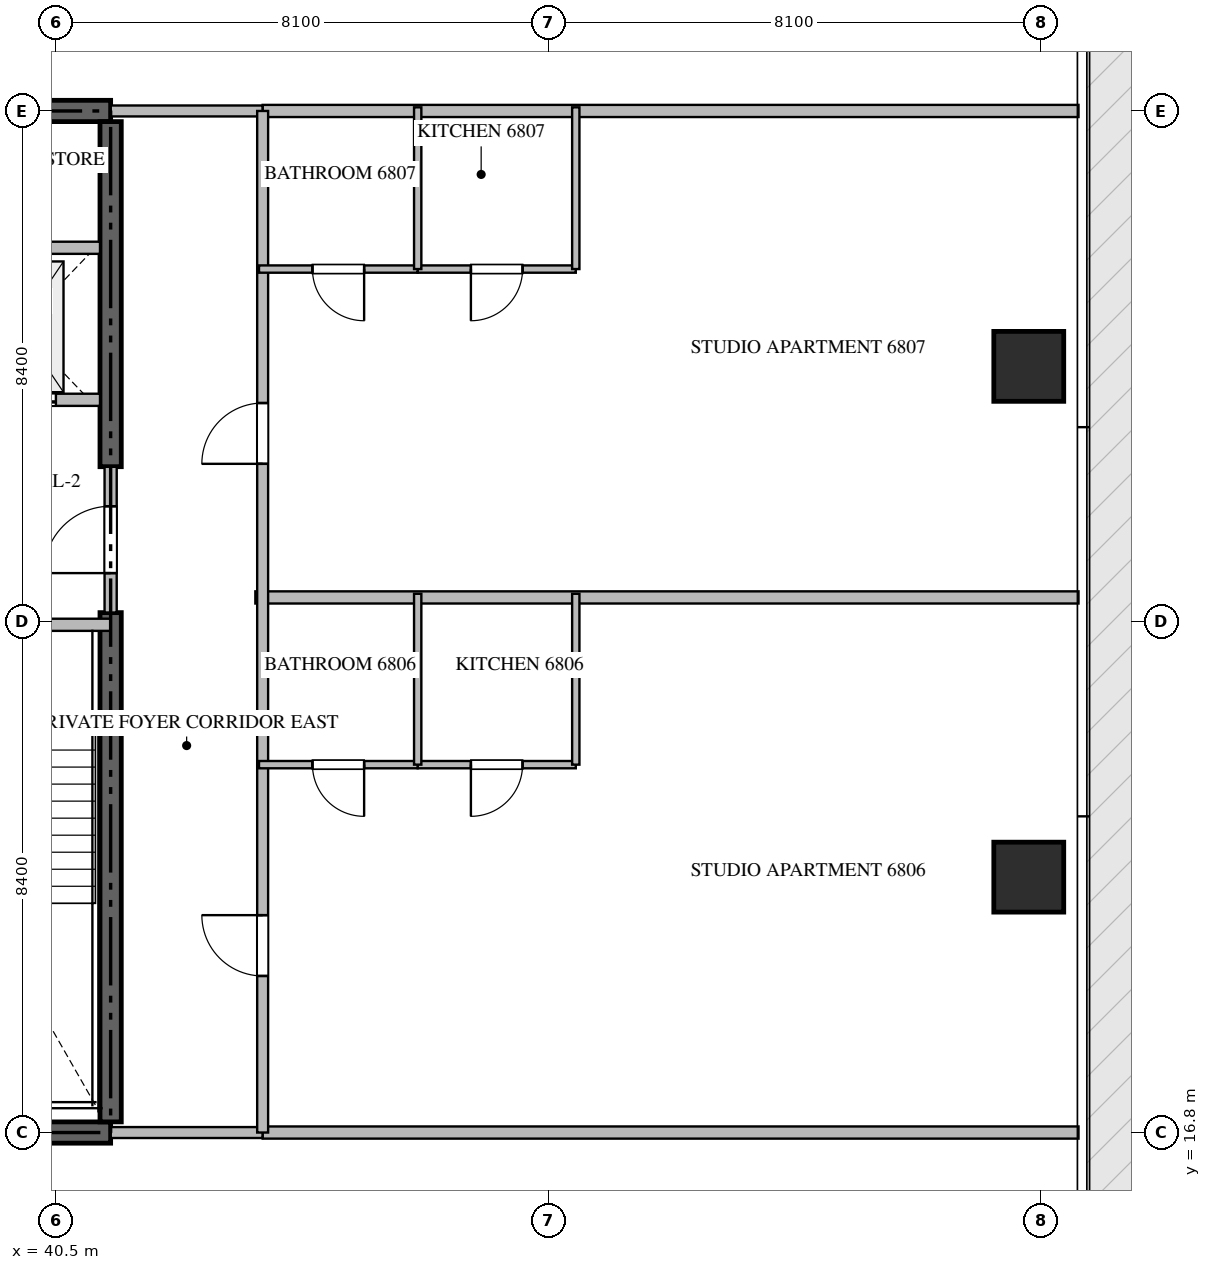
"""IFC4 building model, lengths in metres.
Left out: names, types, materials, properties, quantities, classifications, styles, units other than length and angle.
Written with IfcOpenShell. Run it as: python <this file> out.ifc"""

import sys

from ifc_helpers import new_model, si_unit, direction, frame, frame_2d, origin, origin_2d, place, context, subcontext, project, spatial, rectangle, extrude, source, transform, mapped, element, fill, save


model = new_model("IFC4")
c1 = context("Model", 3, precision=1e-05, world=origin(), true_north=direction((0.0, 1.0)))
c2 = subcontext(c1, "Body", "Model", "MODEL_VIEW")
j1 = project(units=[si_unit("LENGTHUNIT", "METRE"), si_unit("PLANEANGLEUNIT", "RADIAN")], contexts=[c1])
p1 = place(None, origin())
s1 = spatial("IfcSite", under=j1, at=p1, CompositionType="ELEMENT")
p2 = place(p1, origin())
s2 = spatial("IfcBuilding", under=s1, at=p2, CompositionType="ELEMENT")
p3 = place(p2, frame((0.0, 0.0, 272.05)))
s3 = spatial("IfcBuildingStorey", under=s2, at=p3, CompositionType="ELEMENT", Elevation=272.05)
for number, where, z_axis, x_axis in (
    (1, (23.4, 16.8, -0.26), (0.0, 0.0, 1.0), (1.0, 0.0, 0.0)),
    (2, (41.4, 33.6, -0.26), (0.0, 0.0, 1.0), (-1.0, 0.0, 0.0)),
):
    element("IfcWall", number, at=place(p3, frame(where, z_axis=z_axis, x_axis=x_axis)), inside=s3, PredefinedType="SHEAR", context=c2, shape_type="SweptSolid", body=[
        extrude(rectangle(XDim=18.0, YDim=0.35, at=frame_2d((9.0, 0.0))), origin(), (0.0, 0.0, 1.0), 3.848),
    ])
p4 = place(p3, frame((41.4, 16.975, -0.26), z_axis=(0.0, 0.0, 1.0), x_axis=(0.0, 1.0, 0.0)))
e3 = element("IfcWall", 3, at=p4, inside=s3, PredefinedType="SHEAR", context=c2, shape_type="SweptSolid", body=[
    extrude(rectangle(XDim=8.375, YDim=0.35, at=frame_2d((4.188, 0.0))), origin(), (0.0, 0.0, 1.0), 3.848),
])
p5 = place(p3, frame((41.4, 27.75, -0.26), z_axis=(0.0, 0.0, 1.0), x_axis=(0.0, 1.0, 0.0)))
e4 = element("IfcWall", 4, at=p5, inside=s3, PredefinedType="SHEAR", context=c2, shape_type="SweptSolid", body=[
    extrude(rectangle(XDim=5.675, YDim=0.35, at=frame_2d((2.837, 0.0))), origin(), (0.0, 0.0, 1.0), 3.848),
])
m1 = source(origin(), c2, "Body", "SweptSolid", [
    extrude(rectangle(XDim=1.15, YDim=1.15, at=origin_2d()), origin(), (0.0, 0.0, 1.0), 3.85),
])
for number, where, z_axis, x_axis in (
    (5, (56.5, 21.0, -0.26), (0.0, 0.0, 1.0), (1.0, 0.0, 0.0)),
    (6, (56.5, 29.4, -0.26), (0.0, 0.0, 1.0), (1.0, 0.0, 0.0)),
):
    element("IfcColumn", number, at=place(p3, frame(where, z_axis=z_axis, x_axis=x_axis)), inside=s3, PredefinedType="COLUMN", context=c2, shape_type="MappedRepresentation", body=[
        mapped(m1, transform((0.0, 0.0, 0.0), scale=1.0)),
    ])
p6 = place(p3, frame((36.95, 25.15, 0.0), z_axis=(0.0, 0.0, 1.0), x_axis=(1.0, 0.0, 0.0)))
e7 = element("IfcWall", 7, at=p6, inside=s3, PredefinedType="STANDARD", context=c2, shape_type="SweptSolid", body=[
    extrude(rectangle(XDim=4.45, YDim=0.2, at=frame_2d((2.225, 0.0))), origin(), (0.0, 0.0, 1.0), 3.59),
])
p7 = place(p6, frame((1.65, 0.0, 0.0)))
e8 = element("IfcOpeningElement", 8, at=p7, cuts=e7, PredefinedType="OPENING", context=c2, shape_type="SweptSolid", body=[
    extrude(rectangle(XDim=1.1, YDim=2.15, at=frame_2d((0.55, 1.075))), frame((0.0, 0.11, 0.0), z_axis=(0.0, -1.0, 0.0), x_axis=(1.0, 0.0, 0.0)), (0.0, 0.0, 1.0), 0.22),
])
p8 = place(p3, frame((38.75, 28.85, 0.0), z_axis=(0.0, 0.0, 1.0), x_axis=(1.0, 0.0, 0.0)))
e9 = element("IfcWall", 9, at=p8, inside=s3, PredefinedType="STANDARD", context=c2, shape_type="SweptSolid", body=[
    extrude(rectangle(XDim=2.475, YDim=0.2, at=frame_2d((1.238, 0.0))), origin(), (0.0, 0.0, 1.0), 3.59),
])
p9 = place(p8, frame((0.55, 0.0, 0.0)))
e10 = element("IfcOpeningElement", 10, at=p9, cuts=e9, PredefinedType="OPENING", context=c2, shape_type="SweptSolid", body=[
    extrude(rectangle(XDim=1.2, YDim=2.2, at=frame_2d((0.6, 1.1))), frame((0.0, 0.11, 0.0), z_axis=(0.0, -1.0, 0.0), x_axis=(1.0, 0.0, 0.0)), (0.0, 0.0, 1.0), 0.22),
])
p10 = place(p3, frame((38.75, 31.35, 0.0), z_axis=(0.0, 0.0, 1.0), x_axis=(1.0, 0.0, 0.0)))
e11 = element("IfcWall", 11, at=p10, inside=s3, PredefinedType="STANDARD", context=c2, shape_type="SweptSolid", body=[
    extrude(rectangle(XDim=2.475, YDim=0.2, at=frame_2d((1.238, 0.0))), origin(), (0.0, 0.0, 1.0), 3.59),
])
p11 = place(p3, frame((41.4, 25.352, 0.0), z_axis=(0.0, 0.0, 1.0), x_axis=(0.0, 1.0, 0.0)))
e12 = element("IfcWall", 12, at=p11, inside=s3, PredefinedType="STANDARD", context=c2, shape_type="SweptSolid", body=[
    extrude(rectangle(XDim=2.396, YDim=0.2, at=frame_2d((1.198, 0.0))), origin(), (0.0, 0.0, 1.0), 3.59),
])
p12 = place(p11, frame((0.648, 0.0, 0.0)))
e13 = element("IfcOpeningElement", 13, at=p12, cuts=e12, PredefinedType="OPENING", context=c2, shape_type="SweptSolid", body=[
    extrude(rectangle(XDim=1.1, YDim=2.15, at=frame_2d((0.55, 1.075))), frame((0.0, 0.11, 0.0), z_axis=(0.0, -1.0, 0.0), x_axis=(1.0, 0.0, 0.0)), (0.0, 0.0, 1.0), 0.22),
])
p13 = place(p3, frame((43.78, 25.6, 0.0), z_axis=(0.0, 0.0, 1.0), x_axis=(1.0, 0.0, 0.0)))
e14 = element("IfcWall", 14, at=p13, inside=s3, PredefinedType="PARTITIONING", context=c2, shape_type="SweptSolid", body=[
    extrude(rectangle(XDim=13.538, YDim=0.2, at=frame_2d((6.769, 0.0))), origin(), (0.0, 0.0, 1.0), 3.59),
])
for number, where, z_axis, x_axis in (
    (15, (43.9, 16.8, 0.0), (0.0, 0.0, 1.0), (1.0, 0.0, 0.0)),
    (16, (43.9, 33.6, 0.0), (0.0, 0.0, 1.0), (1.0, 0.0, 0.0)),
):
    element("IfcWall", number, at=place(p3, frame(where, z_axis=z_axis, x_axis=x_axis)), inside=s3, PredefinedType="PARTITIONING", context=c2, shape_type="SweptSolid", body=[
        extrude(rectangle(XDim=13.418, YDim=0.2, at=frame_2d((6.709, 0.0))), origin(), (0.0, 0.0, 1.0), 3.59),
    ])
for number, where, z_axis, x_axis in (
    (17, (41.402, 16.8, 0.0), (0.0, 0.0, 1.0), (1.0, 0.0, 0.0)),
    (18, (41.402, 33.6, 0.0), (0.0, 0.0, 1.0), (1.0, 0.0, 0.0)),
):
    element("IfcWall", number, at=place(p3, frame(where, z_axis=z_axis, x_axis=x_axis)), inside=s3, PredefinedType="PARTITIONING", context=c2, shape_type="SweptSolid", body=[
        extrude(rectangle(XDim=2.496, YDim=0.18, at=frame_2d((1.248, 0.0))), origin(), (0.0, 0.0, 1.0), 3.59),
    ])
p14 = place(p3, frame((43.9, 16.8, 0.0), z_axis=(0.0, 0.0, 1.0), x_axis=(0.0, 1.0, 0.0)))
e19 = element("IfcWall", 19, at=p14, inside=s3, PredefinedType="PARTITIONING", context=c2, shape_type="SweptSolid", body=[
    extrude(rectangle(XDim=16.8, YDim=0.18, at=frame_2d((8.4, 0.0))), origin(), (0.0, 0.0, 1.0), 3.59),
])
p15 = place(p14, frame((2.575, 0.0, 0.0)))
e20 = element("IfcOpeningElement", 20, at=p15, cuts=e19, PredefinedType="OPENING", context=c2, shape_type="SweptSolid", body=[
    extrude(rectangle(XDim=1.0, YDim=2.15, at=frame_2d((0.5, 1.075))), frame((0.0, 0.1, 0.0), z_axis=(0.0, -1.0, 0.0), x_axis=(1.0, 0.0, 0.0)), (0.0, 0.0, 1.0), 0.2),
])
p16 = place(p14, frame((10.997, 0.0, 0.0)))
e21 = element("IfcOpeningElement", 21, at=p16, cuts=e19, PredefinedType="OPENING", context=c2, shape_type="SweptSolid", body=[
    extrude(rectangle(XDim=1.0, YDim=2.15, at=frame_2d((0.5, 1.075))), frame((0.0, 0.1, 0.0), z_axis=(0.0, -1.0, 0.0), x_axis=(1.0, 0.0, 0.0)), (0.0, 0.0, 1.0), 0.2),
])
p17 = place(p3, frame((49.05, 22.85, 0.0), z_axis=(0.0, 0.0, 1.0), x_axis=(-1.0, 0.0, 0.0)))
e22 = element("IfcWall", 22, at=p17, inside=s3, PredefinedType="PARTITIONING", context=c2, shape_type="SweptSolid", body=[
    extrude(rectangle(XDim=2.6, YDim=0.12, at=frame_2d((1.3, 0.0))), origin(), (0.0, 0.0, 1.0), 3.59),
])
p18 = place(p17, frame((0.875, 0.0, 0.0)))
e23 = element("IfcOpeningElement", 23, at=p18, cuts=e22, PredefinedType="OPENING", context=c2, shape_type="SweptSolid", body=[
    extrude(rectangle(XDim=0.85, YDim=2.1, at=frame_2d((0.425, 1.05))), frame((0.0, 0.07, 0.0), z_axis=(0.0, -1.0, 0.0), x_axis=(1.0, 0.0, 0.0)), (0.0, 0.0, 1.0), 0.14),
])
p19 = place(p3, frame((46.448, 22.85, 0.0), z_axis=(0.0, 0.0, 1.0), x_axis=(-1.0, 0.0, 0.0)))
e24 = element("IfcWall", 24, at=p19, inside=s3, PredefinedType="PARTITIONING", context=c2, shape_type="SweptSolid", body=[
    extrude(rectangle(XDim=2.608, YDim=0.12, at=frame_2d((1.304, 0.0))), origin(), (0.0, 0.0, 1.0), 3.59),
])
p20 = place(p19, frame((0.879, 0.0, 0.0)))
e25 = element("IfcOpeningElement", 25, at=p20, cuts=e24, PredefinedType="OPENING", context=c2, shape_type="SweptSolid", body=[
    extrude(rectangle(XDim=0.85, YDim=2.1, at=frame_2d((0.425, 1.05))), frame((0.0, 0.07, 0.0), z_axis=(0.0, -1.0, 0.0), x_axis=(1.0, 0.0, 0.0)), (0.0, 0.0, 1.0), 0.14),
])
for number, where, z_axis, x_axis in (
    (26, (46.45, 22.85, 0.0), (0.0, 0.0, 1.0), (0.0, 1.0, 0.0)),
    (27, (49.05, 22.85, 0.0), (0.0, 0.0, 1.0), (0.0, 1.0, 0.0)),
):
    element("IfcWall", number, at=place(p3, frame(where, z_axis=z_axis, x_axis=x_axis)), inside=s3, PredefinedType="PARTITIONING", context=c2, shape_type="SweptSolid", body=[
        extrude(rectangle(XDim=2.81, YDim=0.12, at=frame_2d((1.405, 0.0))), origin(), (0.0, 0.0, 1.0), 3.59),
    ])
p21 = place(p3, frame((49.05, 31.0, 0.0), z_axis=(0.0, 0.0, 1.0), x_axis=(-1.0, 0.0, 0.0)))
e28 = element("IfcWall", 28, at=p21, inside=s3, PredefinedType="PARTITIONING", context=c2, shape_type="SweptSolid", body=[
    extrude(rectangle(XDim=2.6, YDim=0.12, at=frame_2d((1.3, 0.0))), origin(), (0.0, 0.0, 1.0), 3.59),
])
p22 = place(p21, frame((0.875, 0.0, 0.0)))
e29 = element("IfcOpeningElement", 29, at=p22, cuts=e28, PredefinedType="OPENING", context=c2, shape_type="SweptSolid", body=[
    extrude(rectangle(XDim=0.85, YDim=2.1, at=frame_2d((0.425, 1.05))), frame((0.0, 0.07, 0.0), z_axis=(0.0, -1.0, 0.0), x_axis=(1.0, 0.0, 0.0)), (0.0, 0.0, 1.0), 0.14),
])
p23 = place(p3, frame((46.448, 31.0, 0.0), z_axis=(0.0, 0.0, 1.0), x_axis=(-1.0, 0.0, 0.0)))
e30 = element("IfcWall", 30, at=p23, inside=s3, PredefinedType="PARTITIONING", context=c2, shape_type="SweptSolid", body=[
    extrude(rectangle(XDim=2.608, YDim=0.12, at=frame_2d((1.304, 0.0))), origin(), (0.0, 0.0, 1.0), 3.59),
])
p24 = place(p23, frame((0.879, 0.0, 0.0)))
e31 = element("IfcOpeningElement", 31, at=p24, cuts=e30, PredefinedType="OPENING", context=c2, shape_type="SweptSolid", body=[
    extrude(rectangle(XDim=0.85, YDim=2.1, at=frame_2d((0.425, 1.05))), frame((0.0, 0.07, 0.0), z_axis=(0.0, -1.0, 0.0), x_axis=(1.0, 0.0, 0.0)), (0.0, 0.0, 1.0), 0.14),
])
for number, where, z_axis, x_axis in (
    (32, (46.45, 31.0, 0.0), (0.0, 0.0, 1.0), (0.0, 1.0, 0.0)),
    (33, (49.05, 31.0, 0.0), (0.0, 0.0, 1.0), (0.0, 1.0, 0.0)),
):
    element("IfcWall", number, at=place(p3, frame(where, z_axis=z_axis, x_axis=x_axis)), inside=s3, PredefinedType="PARTITIONING", context=c2, shape_type="SweptSolid", body=[
        extrude(rectangle(XDim=2.66, YDim=0.12, at=frame_2d((1.33, 0.0))), origin(), (0.0, 0.0, 1.0), 3.59),
    ])
m2 = source(origin(), c2, "Body", "SweptSolid", [
    extrude(rectangle(XDim=1.2, YDim=2.2, at=frame_2d((0.6, 1.1))), frame((0.0, 0.025, 0.0), z_axis=(0.0, -1.0, 0.0), x_axis=(1.0, 0.0, 0.0)), (0.0, 0.0, 1.0), 0.05),
])
p25 = place(p9, origin())
e34 = element("IfcDoor", 34, at=p25, inside=s3, OperationType="DOUBLE_DOOR_SLIDING", PredefinedType="DOOR", context=c2, shape_type="MappedRepresentation", body=[
    mapped(m2, transform((0.0, 0.0, 0.0), scale=1.0)),
])
fill(e10, e34)
m3 = source(origin(), c2, "Body", "SweptSolid", [
    extrude(rectangle(XDim=1.1, YDim=2.15, at=frame_2d((0.55, 1.075))), frame((0.0, 0.025, 0.0), z_axis=(0.0, -1.0, 0.0), x_axis=(1.0, 0.0, 0.0)), (0.0, 0.0, 1.0), 0.05),
])
p26 = place(p12, origin())
e35 = element("IfcDoor", 35, at=p26, inside=s3, OperationType="SINGLE_SWING_LEFT", PredefinedType="DOOR", context=c2, shape_type="MappedRepresentation", body=[
    mapped(m3, transform((0.0, 0.0, 0.0), scale=1.0)),
])
fill(e13, e35)
m4 = source(origin(), c2, "Body", "SweptSolid", [
    extrude(rectangle(XDim=1.0, YDim=2.15, at=frame_2d((0.5, 1.075))), frame((0.0, 0.025, 0.0), z_axis=(0.0, -1.0, 0.0), x_axis=(1.0, 0.0, 0.0)), (0.0, 0.0, 1.0), 0.05),
])
p27 = place(p15, origin())
e36 = element("IfcDoor", 36, at=p27, inside=s3, OperationType="SINGLE_SWING_RIGHT", PredefinedType="DOOR", context=c2, shape_type="MappedRepresentation", body=[
    mapped(m4, transform((0.0, 0.0, 0.0), scale=1.0)),
])
fill(e20, e36)
p28 = place(p16, origin())
e37 = element("IfcDoor", 37, at=p28, inside=s3, OperationType="SINGLE_SWING_LEFT", PredefinedType="DOOR", context=c2, shape_type="MappedRepresentation", body=[
    mapped(m4, transform((0.0, 0.0, 0.0), scale=1.0)),
])
fill(e21, e37)
m5 = source(origin(), c2, "Body", "SweptSolid", [
    extrude(rectangle(XDim=0.85, YDim=2.1, at=frame_2d((0.425, 1.05))), frame((0.0, 0.025, 0.0), z_axis=(0.0, -1.0, 0.0), x_axis=(1.0, 0.0, 0.0)), (0.0, 0.0, 1.0), 0.05),
])
p29 = place(p18, origin())
e38 = element("IfcDoor", 38, at=p29, inside=s3, OperationType="SINGLE_SWING_RIGHT", PredefinedType="DOOR", context=c2, shape_type="MappedRepresentation", body=[
    mapped(m5, transform((0.0, 0.0, 0.0), scale=1.0)),
])
fill(e23, e38)
p30 = place(p20, origin())
e39 = element("IfcDoor", 39, at=p30, inside=s3, OperationType="SINGLE_SWING_LEFT", PredefinedType="DOOR", context=c2, shape_type="MappedRepresentation", body=[
    mapped(m5, transform((0.0, 0.0, 0.0), scale=1.0)),
])
fill(e25, e39)
p31 = place(p22, origin())
e40 = element("IfcDoor", 40, at=p31, inside=s3, OperationType="SINGLE_SWING_RIGHT", PredefinedType="DOOR", context=c2, shape_type="MappedRepresentation", body=[
    mapped(m5, transform((0.0, 0.0, 0.0), scale=1.0)),
])
fill(e29, e40)
p32 = place(p24, origin())
e41 = element("IfcDoor", 41, at=p32, inside=s3, OperationType="SINGLE_SWING_LEFT", PredefinedType="DOOR", context=c2, shape_type="MappedRepresentation", body=[
    mapped(m5, transform((0.0, 0.0, 0.0), scale=1.0)),
])
fill(e31, e41)
save(model, sys.argv[1])
